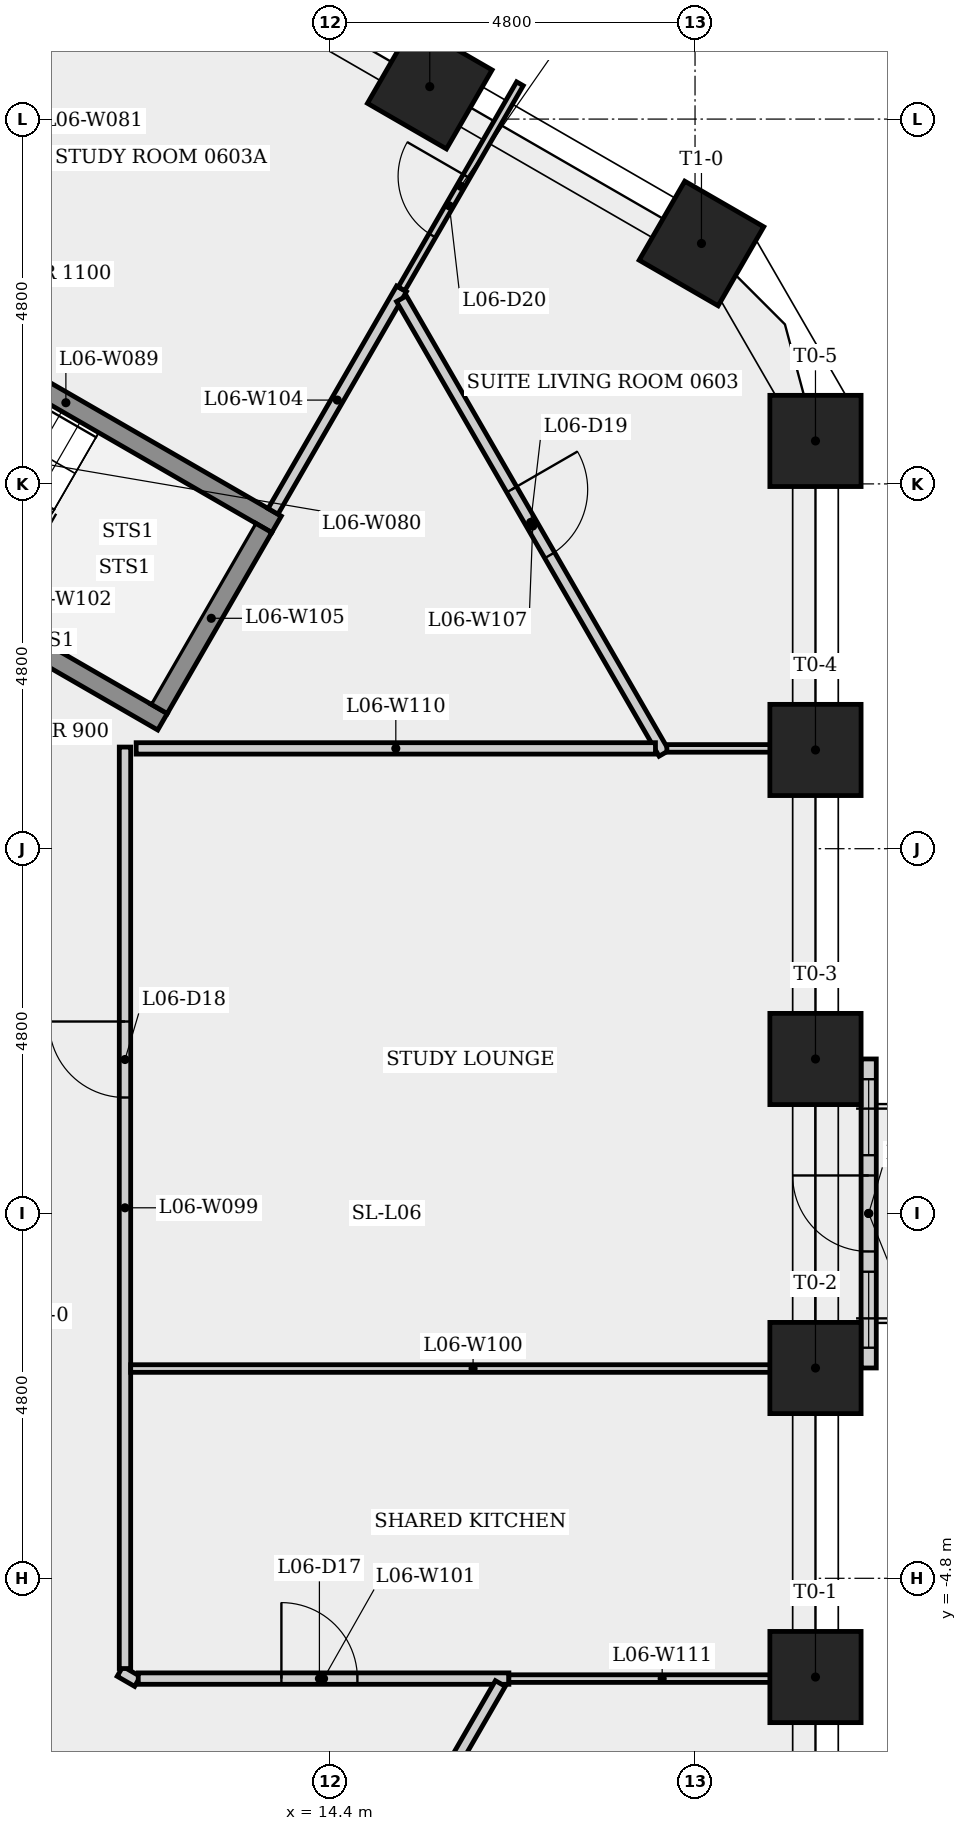
"""IFC4 building model, lengths in metres.
Left out: names, types, materials, properties, quantities, classifications, styles, units other than length and angle.
Written with IfcOpenShell. Run it as: python <this file> out.ifc"""

import sys

from ifc_helpers import new_model, si_unit, direction, frame, frame_2d, origin, origin_2d, place, context, subcontext, project, spatial, rectangle, extrude, element, fill, save


model = new_model("IFC4")
c1 = context("Model", 3, precision=1e-05, world=origin(), true_north=direction((0.0, 1.0)))
c2 = subcontext(c1, "Body", "Model", "MODEL_VIEW")
j1 = project(units=[si_unit("LENGTHUNIT", "METRE"), si_unit("PLANEANGLEUNIT", "RADIAN")], contexts=[c1])
p1 = place(None, origin())
s1 = spatial("IfcSite", under=j1, at=p1, CompositionType="ELEMENT")
p2 = place(p1, origin())
s2 = spatial("IfcBuilding", under=s1, at=p2, CompositionType="ELEMENT")
p3 = place(p2, frame((0.0, 0.0, 28.9)))
s3 = spatial("IfcBuildingStorey", under=s2, at=p3, CompositionType="ELEMENT", Elevation=28.9)
for number, where, z_axis, x_axis in (
    (1, (20.785, -6.099, 0.0), (0.0, 0.0, 1.0), (1.0, 0.0, 0.0)),
    (2, (20.785, -2.033, 0.0), (0.0, 0.0, 1.0), (1.0, 0.0, 0.0)),
    (3, (20.785, 2.033, 0.0), (0.0, 0.0, 1.0), (1.0, 0.0, 0.0)),
    (4, (20.785, 6.099, 0.0), (0.0, 0.0, 1.0), (1.0, 0.0, 0.0)),
    (5, (20.785, 10.165, 0.0), (0.0, 0.0, 1.0), (1.0, 0.0, 0.0)),
    (6, (19.285, 12.763, 0.0), (0.0, 0.0, 1.0), (0.5, 0.866, 0.0)),
    (7, (15.71, 14.827, 0.0), (0.0, 0.0, 1.0), (0.5, 0.866, 0.0)),
):
    element("IfcColumn", number, at=place(p3, frame(where, z_axis=z_axis, x_axis=x_axis)), inside=s3, PredefinedType="COLUMN", context=c2, shape_type="SweptSolid", body=[
        extrude(rectangle(XDim=1.2, YDim=1.2, at=origin_2d()), origin(), (0.0, 0.0, 1.0), 3.4),
    ])
p4 = place(p3, frame((21.485, -2.032, 0.0), z_axis=(0.0, 0.0, 1.0), x_axis=(0.0, 1.0, 0.0)))
e8 = element("IfcWall", 8, at=p4, inside=s3, PredefinedType="SOLIDWALL", context=c2, shape_type="SweptSolid", body=[
    extrude(rectangle(XDim=4.066, YDim=0.2, at=frame_2d((2.033, 0.0))), origin(), (0.0, 0.0, 1.0), 3.4),
])
p5 = place(p4, frame((1.533, 0.0, 0.0)))
e9 = element("IfcOpeningElement", 9, at=p5, cuts=e8, PredefinedType="OPENING", context=c2, shape_type="SweptSolid", body=[
    extrude(rectangle(XDim=1.0, YDim=2.4, at=frame_2d((0.5, 1.2))), frame((0.0, 0.11, 0.0), z_axis=(0.0, -1.0, 0.0), x_axis=(1.0, 0.0, 0.0)), (0.0, 0.0, 1.0), 0.22),
])
p6 = place(p4, frame((0.267, 0.0, 0.9)))
e10 = element("IfcOpeningElement", 10, at=p6, cuts=e8, PredefinedType="OPENING", context=c2, shape_type="SweptSolid", body=[
    extrude(rectangle(XDim=1.0, YDim=1.5, at=frame_2d((0.5, 0.75))), frame((0.0, 0.11, 0.0), z_axis=(0.0, -1.0, 0.0), x_axis=(1.0, 0.0, 0.0)), (0.0, 0.0, 1.0), 0.22),
])
p7 = place(p4, frame((2.8, 0.0, 0.9)))
e11 = element("IfcOpeningElement", 11, at=p7, cuts=e8, PredefinedType="OPENING", context=c2, shape_type="SweptSolid", body=[
    extrude(rectangle(XDim=1.0, YDim=1.5, at=frame_2d((0.5, 0.75))), frame((0.0, 0.11, 0.0), z_axis=(0.0, -1.0, 0.0), x_axis=(1.0, 0.0, 0.0)), (0.0, 0.0, 1.0), 0.22),
])
p8 = place(p3, frame((8.151, 12.268, 0.0), z_axis=(0.0, 0.0, 1.0), x_axis=(0.866025499775, -0.499999833739, 0.0)))
e12 = element("IfcWall", 12, at=p8, inside=s3, PredefinedType="SHEAR", context=c2, shape_type="SweptSolid", body=[
    extrude(rectangle(XDim=6.4, YDim=0.25, at=frame_2d((3.2, 0.0))), origin(), (0.0, 0.0, 1.0), 3.05),
])
p9 = place(p3, frame((11.635, -6.025, 0.0), z_axis=(0.0, 0.0, 1.0), x_axis=(0.865909406545, -0.500200859313, 0.0)))
e13 = element("IfcWall", 13, at=p9, inside=s3, PredefinedType="PARTITIONING", context=c2, shape_type="SweptSolid", body=[
    extrude(rectangle(XDim=0.265, YDim=0.15, at=frame_2d((0.133, 0.0))), origin(), (0.0, 0.0, 1.0), 3.05),
])
p10 = place(p3, frame((11.7, -5.987, 0.0), z_axis=(0.0, 0.0, 1.0), x_axis=(0.0, 1.0, 0.0)))
e14 = element("IfcWall", 14, at=p10, inside=s3, PredefinedType="PARTITIONING", context=c2, shape_type="SweptSolid", body=[
    extrude(rectangle(XDim=12.125, YDim=0.15, at=frame_2d((6.062, 0.0))), origin(), (0.0, 0.0, 1.0), 3.05),
])
p11 = place(p10, frame((7.513, 0.0, 0.0)))
e15 = element("IfcOpeningElement", 15, at=p11, cuts=e14, PredefinedType="OPENING", context=c2, shape_type="SweptSolid", body=[
    extrude(rectangle(XDim=1.0, YDim=2.1, at=frame_2d((0.5, 1.05))), frame((0.0, 0.085, 0.0), z_axis=(0.0, -1.0, 0.0), x_axis=(1.0, 0.0, 0.0)), (0.0, 0.0, 1.0), 0.17),
])
p12 = place(p3, frame((11.775, -2.04, 0.0), z_axis=(0.0, 0.0, 1.0), x_axis=(1.0, 0.0, 0.0)))
e16 = element("IfcWall", 16, at=p12, inside=s3, PredefinedType="PARTITIONING", context=c2, shape_type="SweptSolid", body=[
    extrude(rectangle(XDim=9.01, YDim=0.1, at=frame_2d((4.505, 0.0))), origin(), (0.0, 0.0, 1.0), 3.05),
])
p13 = place(p3, frame((11.875, -6.12, 0.0), z_axis=(0.0, 0.0, 1.0), x_axis=(1.0, 0.0, 0.0)))
e17 = element("IfcWall", 17, at=p13, inside=s3, PredefinedType="PARTITIONING", context=c2, shape_type="SweptSolid", body=[
    extrude(rectangle(XDim=4.876, YDim=0.15, at=frame_2d((2.438, 0.0))), origin(), (0.0, 0.0, 1.0), 3.05),
])
p14 = place(p13, frame((1.883, 0.0, 0.0)))
e18 = element("IfcOpeningElement", 18, at=p14, cuts=e17, PredefinedType="OPENING", context=c2, shape_type="SweptSolid", body=[
    extrude(rectangle(XDim=1.0, YDim=2.1, at=frame_2d((0.5, 1.05))), frame((0.0, 0.085, 0.0), z_axis=(0.0, -1.0, 0.0), x_axis=(1.0, 0.0, 0.0)), (0.0, 0.0, 1.0), 0.17),
])
p15 = place(p3, frame((12.194, 6.47, 0.0), z_axis=(0.0, 0.0, 1.0), x_axis=(-0.866025499775, 0.499999833739, 0.0)))
e19 = element("IfcWall", 19, at=p15, inside=s3, PredefinedType="SHEAR", context=c2, shape_type="SweptSolid", body=[
    extrude(rectangle(XDim=6.4, YDim=0.25, at=frame_2d((3.2, 0.0))), origin(), (0.0, 0.0, 1.0), 3.05),
])
p16 = place(p15, frame((5.25, 0.0, 0.0)))
e20 = element("IfcOpeningElement", 20, at=p16, cuts=e19, PredefinedType="OPENING", context=c2, shape_type="SweptSolid", body=[
    extrude(rectangle(XDim=1.0, YDim=2.1, at=frame_2d((0.5, 1.05))), frame((0.0, 0.135, 0.0), z_axis=(0.0, -1.0, 0.0), x_axis=(1.0, 0.0, 0.0)), (0.0, 0.0, 1.0), 0.27),
])
p17 = place(p3, frame((13.648, 9.239, 0.0), z_axis=(0.0, 0.0, 1.0), x_axis=(0.500022507987, 0.866012408402, 0.0)))
e21 = element("IfcWall", 21, at=p17, inside=s3, PredefinedType="PARTITIONING", context=c2, shape_type="SweptSolid", body=[
    extrude(rectangle(XDim=3.381, YDim=0.15, at=frame_2d((1.69, 0.0))), origin(), (0.0, 0.0, 1.0), 3.05),
])
p18 = place(p3, frame((13.523, 9.022, 0.0), z_axis=(0.0, 0.0, 1.0), x_axis=(-0.500034990121, -0.866005201286, 0.0)))
e22 = element("IfcWall", 22, at=p18, inside=s3, PredefinedType="SHEAR", context=c2, shape_type="SweptSolid", body=[
    extrude(rectangle(XDim=2.75, YDim=0.25, at=frame_2d((1.375, 0.0))), origin(), (0.0, 0.0, 1.0), 3.05),
])
p19 = place(p3, frame((15.338, 12.167, 0.0), z_axis=(0.0, 0.0, 1.0), x_axis=(0.500007335828, 0.866021168401, 0.0)))
e23 = element("IfcWall", 23, at=p19, inside=s3, PredefinedType="PARTITIONING", context=c2, shape_type="SweptSolid", body=[
    extrude(rectangle(XDim=3.116, YDim=0.1, at=frame_2d((1.558, 0.0))), origin(), (0.0, 0.0, 1.0), 3.05),
])
p20 = place(p19, frame((0.81, 0.0, 0.0)))
e24 = element("IfcOpeningElement", 24, at=p20, cuts=e23, PredefinedType="OPENING", context=c2, shape_type="SweptSolid", body=[
    extrude(rectangle(XDim=0.9, YDim=2.1, at=frame_2d((0.45, 1.05))), frame((0.0, 0.06, 0.0), z_axis=(0.0, -1.0, 0.0), x_axis=(1.0, 0.0, 0.0)), (0.0, 0.0, 1.0), 0.12),
])
p21 = place(p3, frame((15.338, 12.037, 0.0), z_axis=(0.0, 0.0, 1.0), x_axis=(0.500020244489, -0.866013715308, 0.0)))
e25 = element("IfcWall", 25, at=p21, inside=s3, PredefinedType="PARTITIONING", context=c2, shape_type="SweptSolid", body=[
    extrude(rectangle(XDim=6.907, YDim=0.15, at=frame_2d((3.454, 0.0))), origin(), (0.0, 0.0, 1.0), 3.05),
])
p22 = place(p21, frame((2.899, 0.0, 0.0)))
e26 = element("IfcOpeningElement", 26, at=p22, cuts=e25, PredefinedType="OPENING", context=c2, shape_type="SweptSolid", body=[
    extrude(rectangle(XDim=1.0, YDim=2.1, at=frame_2d((0.5, 1.05))), frame((0.0, 0.085, 0.0), z_axis=(0.0, -1.0, 0.0), x_axis=(1.0, 0.0, 0.0)), (0.0, 0.0, 1.0), 0.17),
])
p23 = place(p3, frame((16.638, -6.185, 0.0), z_axis=(0.0, 0.0, 1.0), x_axis=(-0.49999235763, -0.866029816064, 0.0)))
e27 = element("IfcWall", 27, at=p23, inside=s3, PredefinedType="PARTITIONING", context=c2, shape_type="SweptSolid", body=[
    extrude(rectangle(XDim=8.143, YDim=0.15, at=frame_2d((4.072, 0.0))), origin(), (0.0, 0.0, 1.0), 3.05),
])
p24 = place(p23, frame((3.572, 0.0, 0.0)))
e28 = element("IfcOpeningElement", 28, at=p24, cuts=e27, PredefinedType="OPENING", context=c2, shape_type="SweptSolid", body=[
    extrude(rectangle(XDim=1.0, YDim=2.1, at=frame_2d((0.5, 1.05))), frame((0.0, 0.085, 0.0), z_axis=(0.0, -1.0, 0.0), x_axis=(1.0, 0.0, 0.0)), (0.0, 0.0, 1.0), 0.17),
])
p25 = place(p3, frame((18.829, 6.12, 0.0), z_axis=(0.0, 0.0, 1.0), x_axis=(1.0, 0.0, 0.0)))
e29 = element("IfcWall", 29, at=p25, inside=s3, PredefinedType="PARTITIONING", context=c2, shape_type="SweptSolid", body=[
    extrude(rectangle(XDim=1.955, YDim=0.1, at=frame_2d((0.978, 0.0))), origin(), (0.0, 0.0, 1.0), 3.05),
])
p26 = place(p3, frame((18.679, 6.12, 0.0), z_axis=(0.0, 0.0, 1.0), x_axis=(-1.0, 0.0, 0.0)))
e30 = element("IfcWall", 30, at=p26, inside=s3, PredefinedType="PARTITIONING", context=c2, shape_type="SweptSolid", body=[
    extrude(rectangle(XDim=6.833, YDim=0.15, at=frame_2d((3.416, 0.0))), origin(), (0.0, 0.0, 1.0), 3.05),
])
p27 = place(p3, frame((20.785, -6.12, 0.0), z_axis=(0.0, 0.0, 1.0), x_axis=(-1.0, 0.0, 0.0)))
e31 = element("IfcWall", 31, at=p27, inside=s3, PredefinedType="PARTITIONING", context=c2, shape_type="SweptSolid", body=[
    extrude(rectangle(XDim=4.034, YDim=0.1, at=frame_2d((2.017, 0.0))), origin(), (0.0, 0.0, 1.0), 3.05),
])
p28 = place(p5, origin())
e32 = element("IfcDoor", 32, at=p28, inside=s3, OperationType="SINGLE_SWING_RIGHT", PredefinedType="DOOR", context=c2, shape_type="SweptSolid", body=[
    extrude(rectangle(XDim=1.0, YDim=2.4, at=frame_2d((0.5, 1.2))), frame((0.0, 0.025, 0.0), z_axis=(0.0, -1.0, 0.0), x_axis=(1.0, 0.0, 0.0)), (0.0, 0.0, 1.0), 0.05),
])
fill(e9, e32)
p29 = place(p6, origin())
e33 = element("IfcWindow", 33, at=p29, inside=s3, PartitioningType="SINGLE_PANEL", PredefinedType="WINDOW", context=c2, shape_type="SweptSolid", body=[
    extrude(rectangle(XDim=1.0, YDim=1.5, at=frame_2d((0.5, 0.75))), frame((0.0, 0.03, 0.0), z_axis=(0.0, -1.0, 0.0), x_axis=(1.0, 0.0, 0.0)), (0.0, 0.0, 1.0), 0.06),
])
fill(e10, e33)
p30 = place(p7, origin())
e34 = element("IfcWindow", 34, at=p30, inside=s3, PartitioningType="SINGLE_PANEL", PredefinedType="WINDOW", context=c2, shape_type="SweptSolid", body=[
    extrude(rectangle(XDim=1.0, YDim=1.5, at=frame_2d((0.5, 0.75))), frame((0.0, 0.03, 0.0), z_axis=(0.0, -1.0, 0.0), x_axis=(1.0, 0.0, 0.0)), (0.0, 0.0, 1.0), 0.06),
])
fill(e11, e34)
p31 = place(p14, origin())
e35 = element("IfcDoor", 35, at=p31, inside=s3, OperationType="SINGLE_SWING_LEFT", PredefinedType="DOOR", context=c2, shape_type="SweptSolid", body=[
    extrude(rectangle(XDim=1.0, YDim=2.1, at=frame_2d((0.5, 1.05))), frame((0.0, 0.025, 0.0), z_axis=(0.0, -1.0, 0.0), x_axis=(1.0, 0.0, 0.0)), (0.0, 0.0, 1.0), 0.05),
])
fill(e18, e35)
p32 = place(p11, origin())
e36 = element("IfcDoor", 36, at=p32, inside=s3, OperationType="SINGLE_SWING_RIGHT", PredefinedType="DOOR", context=c2, shape_type="SweptSolid", body=[
    extrude(rectangle(XDim=1.0, YDim=2.1, at=frame_2d((0.5, 1.05))), frame((0.0, 0.025, 0.0), z_axis=(0.0, -1.0, 0.0), x_axis=(1.0, 0.0, 0.0)), (0.0, 0.0, 1.0), 0.05),
])
fill(e15, e36)
p33 = place(p22, origin())
e37 = element("IfcDoor", 37, at=p33, inside=s3, OperationType="SINGLE_SWING_LEFT", PredefinedType="DOOR", context=c2, shape_type="SweptSolid", body=[
    extrude(rectangle(XDim=1.0, YDim=2.1, at=frame_2d((0.5, 1.05))), frame((0.0, 0.025, 0.0), z_axis=(0.0, -1.0, 0.0), x_axis=(1.0, 0.0, 0.0)), (0.0, 0.0, 1.0), 0.05),
])
fill(e26, e37)
p34 = place(p20, origin())
e38 = element("IfcDoor", 38, at=p34, inside=s3, OperationType="SINGLE_SWING_RIGHT", PredefinedType="DOOR", context=c2, shape_type="SweptSolid", body=[
    extrude(rectangle(XDim=0.9, YDim=2.1, at=frame_2d((0.45, 1.05))), frame((0.0, 0.025, 0.0), z_axis=(0.0, -1.0, 0.0), x_axis=(1.0, 0.0, 0.0)), (0.0, 0.0, 1.0), 0.05),
])
fill(e24, e38)
save(model, sys.argv[1])
